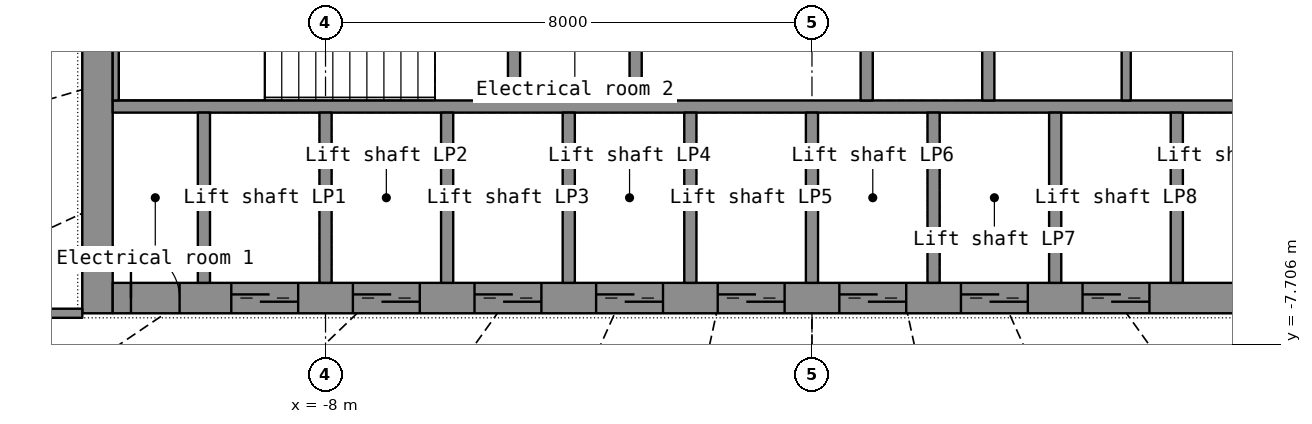
"""IFC4 building model, lengths in metres.
Left out: names, types, materials, properties, quantities, classifications, styles, units other than length and angle.
Written with IfcOpenShell. Run it as: python <this file> out.ifc"""

import sys

from ifc_helpers import new_model, si_unit, direction, frame, frame_2d, origin, place, context, subcontext, project, spatial, rectangle, extrude, element, fill, save


model = new_model("IFC4")
c1 = context("Model", 3, precision=1e-05, world=origin(), true_north=direction((0.0, 1.0)))
c2 = subcontext(c1, "Body", "Model", "MODEL_VIEW")
j1 = project(units=[si_unit("LENGTHUNIT", "METRE"), si_unit("PLANEANGLEUNIT", "RADIAN")], contexts=[c1])
p1 = place(None, origin())
s1 = spatial("IfcSite", under=j1, at=p1, CompositionType="ELEMENT")
p2 = place(p1, origin())
s2 = spatial("IfcBuilding", under=s1, at=p2, CompositionType="ELEMENT")
p3 = place(p2, frame((0.0, 0.0, 123.0)))
s3 = spatial("IfcBuildingStorey", under=s2, at=p3, CompositionType="ELEMENT", Elevation=123.0)
p4 = place(p3, frame((-11.75, -7.2, 0.0), z_axis=(0.0, 0.0, 1.0), x_axis=(0.0, 1.0, 0.0)))
e1 = element("IfcWall", 1, at=p4, inside=s3, PredefinedType="SHEAR", context=c2, shape_type="SweptSolid", body=[
    extrude(rectangle(XDim=14.4, YDim=0.5, at=frame_2d((7.2, 0.0))), origin(), (0.0, 0.0, 1.0), 3.3),
])
p5 = place(p4, frame((6.5, 0.0, 0.0)))
e2 = element("IfcOpeningElement", 2, at=p5, cuts=e1, PredefinedType="OPENING", context=c2, shape_type="SweptSolid", body=[
    extrude(rectangle(XDim=1.4, YDim=2.2, at=frame_2d((0.7, 1.1))), frame((0.0, 0.26, 0.0), z_axis=(0.0, -1.0, 0.0), x_axis=(1.0, 0.0, 0.0)), (0.0, 0.0, 1.0), 0.52),
])
p6 = place(p3, frame((-11.5, -6.95, 0.0), z_axis=(0.0, 0.0, 1.0), x_axis=(1.0, 0.0, 0.0)))
e3 = element("IfcWall", 3, at=p6, inside=s3, PredefinedType="SHEAR", context=c2, shape_type="SweptSolid", body=[
    extrude(rectangle(XDim=23.0, YDim=0.5, at=frame_2d((11.5, 0.0))), origin(), (0.0, 0.0, 1.0), 3.3),
])
p7 = place(p6, frame((1.95, 0.0, 0.0)))
e4 = element("IfcOpeningElement", 4, at=p7, cuts=e3, PredefinedType="OPENING", context=c2, shape_type="SweptSolid", body=[
    extrude(rectangle(XDim=1.1, YDim=2.2, at=frame_2d((0.55, 1.1))), frame((0.0, 0.26, 0.0), z_axis=(0.0, -1.0, 0.0), x_axis=(1.0, 0.0, 0.0)), (0.0, 0.0, 1.0), 0.52),
])
p8 = place(p6, frame((3.95, 0.0, 0.0)))
e5 = element("IfcOpeningElement", 5, at=p8, cuts=e3, PredefinedType="OPENING", context=c2, shape_type="SweptSolid", body=[
    extrude(rectangle(XDim=1.1, YDim=2.2, at=frame_2d((0.55, 1.1))), frame((0.0, 0.26, 0.0), z_axis=(0.0, -1.0, 0.0), x_axis=(1.0, 0.0, 0.0)), (0.0, 0.0, 1.0), 0.52),
])
p9 = place(p6, frame((5.95, 0.0, 0.0)))
e6 = element("IfcOpeningElement", 6, at=p9, cuts=e3, PredefinedType="OPENING", context=c2, shape_type="SweptSolid", body=[
    extrude(rectangle(XDim=1.1, YDim=2.2, at=frame_2d((0.55, 1.1))), frame((0.0, 0.26, 0.0), z_axis=(0.0, -1.0, 0.0), x_axis=(1.0, 0.0, 0.0)), (0.0, 0.0, 1.0), 0.52),
])
p10 = place(p6, frame((7.95, 0.0, 0.0)))
e7 = element("IfcOpeningElement", 7, at=p10, cuts=e3, PredefinedType="OPENING", context=c2, shape_type="SweptSolid", body=[
    extrude(rectangle(XDim=1.1, YDim=2.2, at=frame_2d((0.55, 1.1))), frame((0.0, 0.26, 0.0), z_axis=(0.0, -1.0, 0.0), x_axis=(1.0, 0.0, 0.0)), (0.0, 0.0, 1.0), 0.52),
])
p11 = place(p6, frame((9.95, 0.0, 0.0)))
e8 = element("IfcOpeningElement", 8, at=p11, cuts=e3, PredefinedType="OPENING", context=c2, shape_type="SweptSolid", body=[
    extrude(rectangle(XDim=1.1, YDim=2.2, at=frame_2d((0.55, 1.1))), frame((0.0, 0.26, 0.0), z_axis=(0.0, -1.0, 0.0), x_axis=(1.0, 0.0, 0.0)), (0.0, 0.0, 1.0), 0.52),
])
p12 = place(p6, frame((11.95, 0.0, 0.0)))
e9 = element("IfcOpeningElement", 9, at=p12, cuts=e3, PredefinedType="OPENING", context=c2, shape_type="SweptSolid", body=[
    extrude(rectangle(XDim=1.1, YDim=2.2, at=frame_2d((0.55, 1.1))), frame((0.0, 0.26, 0.0), z_axis=(0.0, -1.0, 0.0), x_axis=(1.0, 0.0, 0.0)), (0.0, 0.0, 1.0), 0.52),
])
p13 = place(p6, frame((13.95, 0.0, 0.0)))
e10 = element("IfcOpeningElement", 10, at=p13, cuts=e3, PredefinedType="OPENING", context=c2, shape_type="SweptSolid", body=[
    extrude(rectangle(XDim=1.1, YDim=2.2, at=frame_2d((0.55, 1.1))), frame((0.0, 0.26, 0.0), z_axis=(0.0, -1.0, 0.0), x_axis=(1.0, 0.0, 0.0)), (0.0, 0.0, 1.0), 0.52),
])
p14 = place(p6, frame((15.95, 0.0, 0.0)))
e11 = element("IfcOpeningElement", 11, at=p14, cuts=e3, PredefinedType="OPENING", context=c2, shape_type="SweptSolid", body=[
    extrude(rectangle(XDim=1.1, YDim=2.2, at=frame_2d((0.55, 1.1))), frame((0.0, 0.26, 0.0), z_axis=(0.0, -1.0, 0.0), x_axis=(1.0, 0.0, 0.0)), (0.0, 0.0, 1.0), 0.52),
])
p15 = place(p6, frame((19.95, 0.0, 0.0)))
e12 = element("IfcOpeningElement", 12, at=p15, cuts=e3, PredefinedType="OPENING", context=c2, shape_type="SweptSolid", body=[
    extrude(rectangle(XDim=1.1, YDim=2.2, at=frame_2d((0.55, 1.1))), frame((0.0, 0.26, 0.0), z_axis=(0.0, -1.0, 0.0), x_axis=(1.0, 0.0, 0.0)), (0.0, 0.0, 1.0), 0.52),
])
p16 = place(p6, frame((0.3, 0.0, 0.0)))
e13 = element("IfcOpeningElement", 13, at=p16, cuts=e3, PredefinedType="OPENING", context=c2, shape_type="SweptSolid", body=[
    extrude(rectangle(XDim=0.8, YDim=2.05, at=frame_2d((0.4, 1.025))), frame((0.0, 0.26, 0.0), z_axis=(0.0, -1.0, 0.0), x_axis=(1.0, 0.0, 0.0)), (0.0, 0.0, 1.0), 0.52),
])
p17 = place(p6, frame((21.9, 0.0, 0.0)))
e14 = element("IfcOpeningElement", 14, at=p17, cuts=e3, PredefinedType="OPENING", context=c2, shape_type="SweptSolid", body=[
    extrude(rectangle(XDim=0.8, YDim=2.05, at=frame_2d((0.4, 1.025))), frame((0.0, 0.26, 0.0), z_axis=(0.0, -1.0, 0.0), x_axis=(1.0, 0.0, 0.0)), (0.0, 0.0, 1.0), 0.52),
])
p18 = place(p3, frame((-11.5, -3.8, 0.0), z_axis=(0.0, 0.0, 1.0), x_axis=(1.0, 0.0, 0.0)))
e15 = element("IfcWall", 15, at=p18, inside=s3, PredefinedType="SHEAR", context=c2, shape_type="SweptSolid", body=[
    extrude(rectangle(XDim=23.0, YDim=0.2, at=frame_2d((11.5, 0.0))), origin(), (0.0, 0.0, 1.0), 3.3),
])
for number, where, z_axis, x_axis in (
    (16, (-10.0, -6.7, 0.0), (0.0, 0.0, 1.0), (0.0, 1.0, 0.0)),
    (17, (-8.0, -6.7, 0.0), (0.0, 0.0, 1.0), (0.0, 1.0, 0.0)),
    (18, (-6.0, -6.7, 0.0), (0.0, 0.0, 1.0), (0.0, 1.0, 0.0)),
    (19, (-4.0, -6.7, 0.0), (0.0, 0.0, 1.0), (0.0, 1.0, 0.0)),
    (20, (-2.0, -6.7, 0.0), (0.0, 0.0, 1.0), (0.0, 1.0, 0.0)),
    (21, (0.0, -6.7, 0.0), (0.0, 0.0, 1.0), (0.0, 1.0, 0.0)),
    (22, (2.0, -6.7, 0.0), (0.0, 0.0, 1.0), (0.0, 1.0, 0.0)),
    (23, (4.0, -6.7, 0.0), (0.0, 0.0, 1.0), (0.0, 1.0, 0.0)),
    (24, (6.0, -6.7, 0.0), (0.0, 0.0, 1.0), (0.0, 1.0, 0.0)),
):
    element("IfcWall", number, at=place(p3, frame(where, z_axis=z_axis, x_axis=x_axis)), inside=s3, PredefinedType="SHEAR", context=c2, shape_type="SweptSolid", body=[
        extrude(rectangle(XDim=2.8, YDim=0.2, at=frame_2d((1.4, 0.0))), origin(), (0.0, 0.0, 1.0), 3.3),
    ])
p19 = place(p3, frame((-2.9, -3.7, 0.0), z_axis=(0.0, 0.0, 1.0), x_axis=(0.0, 1.0, 0.0)))
e25 = element("IfcWall", 25, at=p19, inside=s3, PredefinedType="SHEAR", context=c2, shape_type="SweptSolid", body=[
    extrude(rectangle(XDim=7.4, YDim=0.2, at=frame_2d((3.7, 0.0))), origin(), (0.0, 0.0, 1.0), 3.3),
])
p20 = place(p19, frame((3.1, 0.0, 0.0)))
e26 = element("IfcOpeningElement", 26, at=p20, cuts=e25, PredefinedType="OPENING", context=c2, shape_type="SweptSolid", body=[
    extrude(rectangle(XDim=1.2, YDim=2.2, at=frame_2d((0.6, 1.1))), frame((0.0, 0.11, 0.0), z_axis=(0.0, -1.0, 0.0), x_axis=(1.0, 0.0, 0.0)), (0.0, 0.0, 1.0), 0.22),
])
p21 = place(p3, frame((2.9, -3.7, 0.0), z_axis=(0.0, 0.0, 1.0), x_axis=(0.0, 1.0, 0.0)))
e27 = element("IfcWall", 27, at=p21, inside=s3, PredefinedType="SHEAR", context=c2, shape_type="SweptSolid", body=[
    extrude(rectangle(XDim=7.4, YDim=0.2, at=frame_2d((3.7, 0.0))), origin(), (0.0, 0.0, 1.0), 3.3),
])
p22 = place(p21, frame((3.1, 0.0, 0.0)))
e28 = element("IfcOpeningElement", 28, at=p22, cuts=e27, PredefinedType="OPENING", context=c2, shape_type="SweptSolid", body=[
    extrude(rectangle(XDim=1.2, YDim=2.2, at=frame_2d((0.6, 1.1))), frame((0.0, 0.11, 0.0), z_axis=(0.0, -1.0, 0.0), x_axis=(1.0, 0.0, 0.0)), (0.0, 0.0, 1.0), 0.22),
])
p23 = place(p3, frame((0.9, -3.7, 0.0), z_axis=(0.0, 0.0, 1.0), x_axis=(0.0, 1.0, 0.0)))
e29 = element("IfcWall", 29, at=p23, inside=s3, PredefinedType="SHEAR", context=c2, shape_type="SweptSolid", body=[
    extrude(rectangle(XDim=2.35, YDim=0.2, at=frame_2d((1.175, 0.0))), origin(), (0.0, 0.0, 1.0), 3.3),
])
p24 = place(p3, frame((-11.45, -3.7, 0.0), z_axis=(0.0, 0.0, 1.0), x_axis=(0.0, 1.0, 0.0)))
e30 = element("IfcWall", 30, at=p24, inside=s3, PredefinedType="SHEAR", context=c2, shape_type="SweptSolid", body=[
    extrude(rectangle(XDim=2.35, YDim=0.1, at=frame_2d((1.175, 0.0))), origin(), (0.0, 0.0, 1.0), 3.3),
])
p25 = place(p3, frame((-4.9, -3.7, 0.0), z_axis=(0.0, 0.0, 1.0), x_axis=(0.0, 1.0, 0.0)))
e31 = element("IfcWall", 31, at=p25, inside=s3, PredefinedType="SHEAR", context=c2, shape_type="SweptSolid", body=[
    extrude(rectangle(XDim=2.35, YDim=0.2, at=frame_2d((1.175, 0.0))), origin(), (0.0, 0.0, 1.0), 3.3),
])
p26 = place(p3, frame((5.168, -3.7, 0.0), z_axis=(0.0, 0.0, 1.0), x_axis=(0.0, 1.0, 0.0)))
e32 = element("IfcWall", 32, at=p26, inside=s3, PredefinedType="PARTITIONING", context=c2, shape_type="SweptSolid", body=[
    extrude(rectangle(XDim=2.35, YDim=0.15, at=frame_2d((1.175, 0.0))), origin(), (0.0, 0.0, 1.0), 3.3),
])
p27 = place(p3, frame((-16.0, -3.512, 0.0), z_axis=(0.0, 0.0, 1.0), x_axis=(0.976750433, 0.214379551, 0.0)))
e33 = element("IfcWall", 33, at=p27, inside=s3, PredefinedType="PARTITIONING", context=c2, shape_type="SweptSolid", body=[
    extrude(rectangle(XDim=4.095, YDim=0.15, at=frame_2d((2.048, 0.0))), origin(), (0.0, 0.0, 1.0), 2.4),
])
p28 = place(p3, frame((-12.0, -7.2, 0.0), z_axis=(0.0, 0.0, 1.0), x_axis=(-1.0, 0.0, 0.0)))
e34 = element("IfcWall", 34, at=p28, inside=s3, PredefinedType="PARTITIONING", context=c2, shape_type="SweptSolid", body=[
    extrude(rectangle(XDim=4.0, YDim=0.15, at=frame_2d((2.0, 0.0))), origin(), (0.0, 0.0, 1.0), 2.4),
])
p29 = place(p28, frame((1.525, 0.0, 0.0)))
e35 = element("IfcOpeningElement", 35, at=p29, cuts=e34, PredefinedType="OPENING", context=c2, shape_type="SweptSolid", body=[
    extrude(rectangle(XDim=0.95, YDim=2.15, at=frame_2d((0.475, 1.075))), frame((0.0, 0.085, 0.0), z_axis=(0.0, -1.0, 0.0), x_axis=(1.0, 0.0, 0.0)), (0.0, 0.0, 1.0), 0.17),
])
p30 = place(p7, origin())
e36 = element("IfcDoor", 36, at=p30, inside=s3, OperationType="DOUBLE_DOOR_SLIDING", PredefinedType="DOOR", context=c2, shape_type="SweptSolid", body=[
    extrude(rectangle(XDim=1.1, YDim=2.2, at=frame_2d((0.55, 1.1))), frame((0.0, 0.025, 0.0), z_axis=(0.0, -1.0, 0.0), x_axis=(1.0, 0.0, 0.0)), (0.0, 0.0, 1.0), 0.05),
])
fill(e4, e36)
p31 = place(p8, origin())
e37 = element("IfcDoor", 37, at=p31, inside=s3, OperationType="DOUBLE_DOOR_SLIDING", PredefinedType="DOOR", context=c2, shape_type="SweptSolid", body=[
    extrude(rectangle(XDim=1.1, YDim=2.2, at=frame_2d((0.55, 1.1))), frame((0.0, 0.025, 0.0), z_axis=(0.0, -1.0, 0.0), x_axis=(1.0, 0.0, 0.0)), (0.0, 0.0, 1.0), 0.05),
])
fill(e5, e37)
p32 = place(p9, origin())
e38 = element("IfcDoor", 38, at=p32, inside=s3, OperationType="DOUBLE_DOOR_SLIDING", PredefinedType="DOOR", context=c2, shape_type="SweptSolid", body=[
    extrude(rectangle(XDim=1.1, YDim=2.2, at=frame_2d((0.55, 1.1))), frame((0.0, 0.025, 0.0), z_axis=(0.0, -1.0, 0.0), x_axis=(1.0, 0.0, 0.0)), (0.0, 0.0, 1.0), 0.05),
])
fill(e6, e38)
p33 = place(p10, origin())
e39 = element("IfcDoor", 39, at=p33, inside=s3, OperationType="DOUBLE_DOOR_SLIDING", PredefinedType="DOOR", context=c2, shape_type="SweptSolid", body=[
    extrude(rectangle(XDim=1.1, YDim=2.2, at=frame_2d((0.55, 1.1))), frame((0.0, 0.025, 0.0), z_axis=(0.0, -1.0, 0.0), x_axis=(1.0, 0.0, 0.0)), (0.0, 0.0, 1.0), 0.05),
])
fill(e7, e39)
p34 = place(p11, origin())
e40 = element("IfcDoor", 40, at=p34, inside=s3, OperationType="DOUBLE_DOOR_SLIDING", PredefinedType="DOOR", context=c2, shape_type="SweptSolid", body=[
    extrude(rectangle(XDim=1.1, YDim=2.2, at=frame_2d((0.55, 1.1))), frame((0.0, 0.025, 0.0), z_axis=(0.0, -1.0, 0.0), x_axis=(1.0, 0.0, 0.0)), (0.0, 0.0, 1.0), 0.05),
])
fill(e8, e40)
p35 = place(p12, origin())
e41 = element("IfcDoor", 41, at=p35, inside=s3, OperationType="DOUBLE_DOOR_SLIDING", PredefinedType="DOOR", context=c2, shape_type="SweptSolid", body=[
    extrude(rectangle(XDim=1.1, YDim=2.2, at=frame_2d((0.55, 1.1))), frame((0.0, 0.025, 0.0), z_axis=(0.0, -1.0, 0.0), x_axis=(1.0, 0.0, 0.0)), (0.0, 0.0, 1.0), 0.05),
])
fill(e9, e41)
p36 = place(p13, origin())
e42 = element("IfcDoor", 42, at=p36, inside=s3, OperationType="DOUBLE_DOOR_SLIDING", PredefinedType="DOOR", context=c2, shape_type="SweptSolid", body=[
    extrude(rectangle(XDim=1.1, YDim=2.2, at=frame_2d((0.55, 1.1))), frame((0.0, 0.025, 0.0), z_axis=(0.0, -1.0, 0.0), x_axis=(1.0, 0.0, 0.0)), (0.0, 0.0, 1.0), 0.05),
])
fill(e10, e42)
p37 = place(p14, origin())
e43 = element("IfcDoor", 43, at=p37, inside=s3, OperationType="DOUBLE_DOOR_SLIDING", PredefinedType="DOOR", context=c2, shape_type="SweptSolid", body=[
    extrude(rectangle(XDim=1.1, YDim=2.2, at=frame_2d((0.55, 1.1))), frame((0.0, 0.025, 0.0), z_axis=(0.0, -1.0, 0.0), x_axis=(1.0, 0.0, 0.0)), (0.0, 0.0, 1.0), 0.05),
])
fill(e11, e43)
p38 = place(p16, origin())
e44 = element("IfcDoor", 44, at=p38, inside=s3, OperationType="SINGLE_SWING_LEFT", PredefinedType="DOOR", context=c2, shape_type="SweptSolid", body=[
    extrude(rectangle(XDim=0.8, YDim=2.05, at=frame_2d((0.4, 1.025))), frame((0.0, 0.025, 0.0), z_axis=(0.0, -1.0, 0.0), x_axis=(1.0, 0.0, 0.0)), (0.0, 0.0, 1.0), 0.05),
])
fill(e13, e44)
save(model, sys.argv[1])
